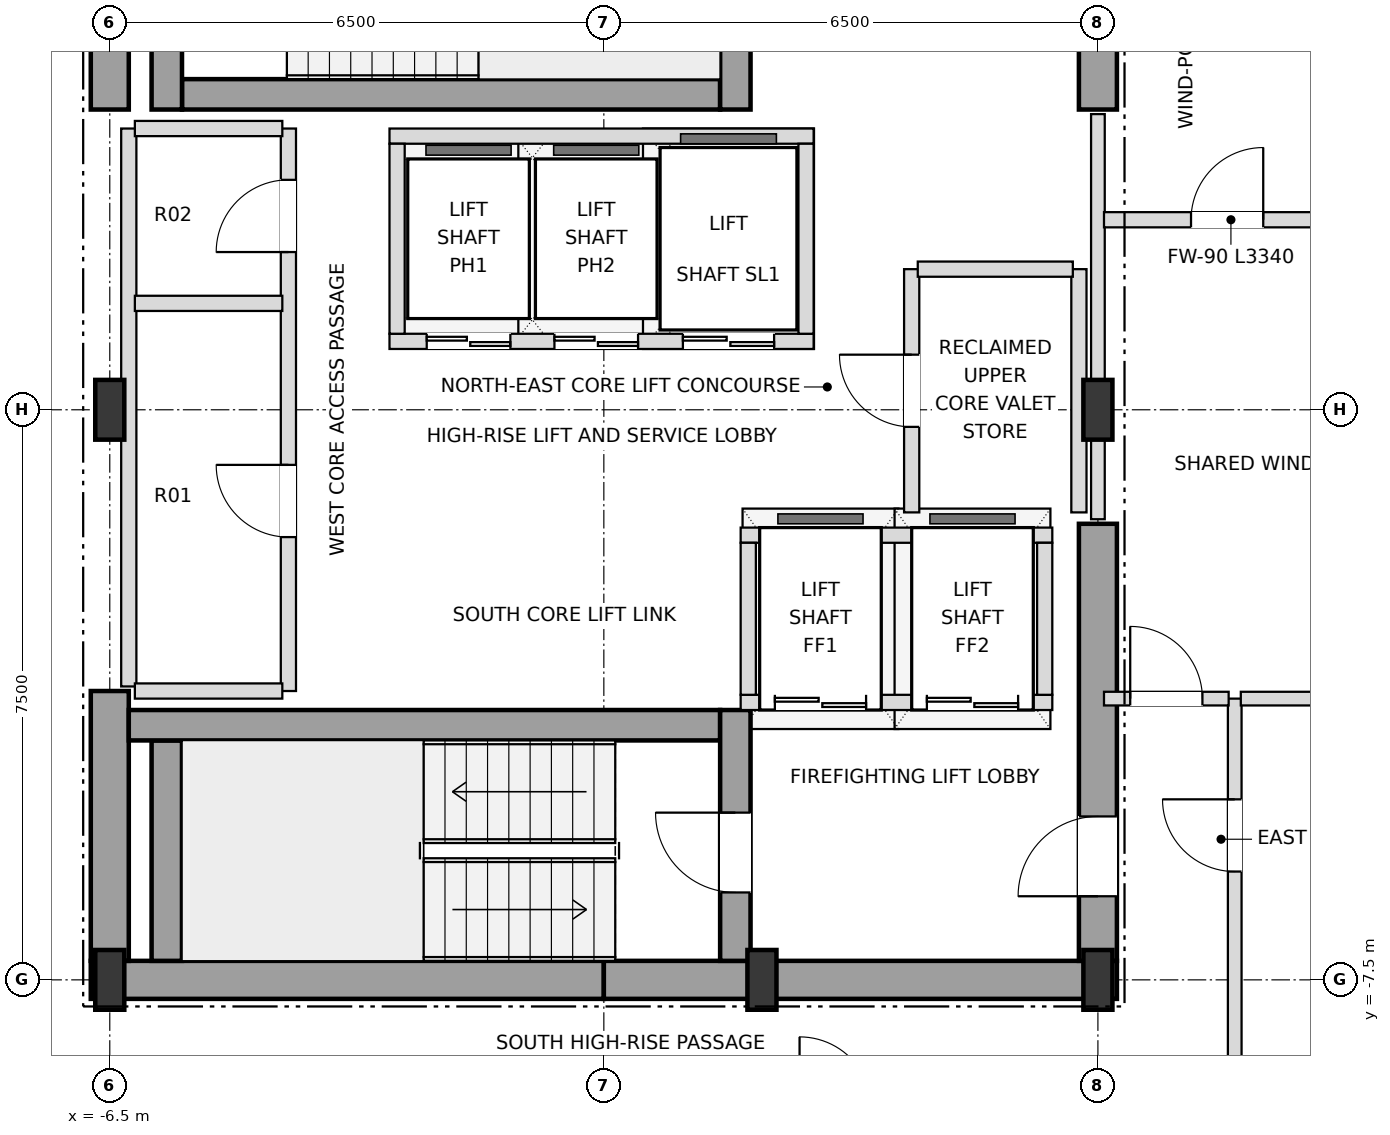
"""IFC4 building model, lengths in metres.
Left out: names, types, materials, properties, quantities, classifications, styles, units other than length and angle.
Written with IfcOpenShell. Run it as: python <this file> out.ifc"""

import sys

from ifc_helpers import new_model, si_unit, direction, frame, frame_2d, origin, origin_2d, place, context, subcontext, project, spatial, rectangle, i_section, extrude, element, fill, save


model = new_model("IFC4")
c1 = context("Model", 3, precision=1e-05, world=origin(), true_north=direction((0.0, 1.0)))
c2 = subcontext(c1, "Body", "Model", "MODEL_VIEW")
j1 = project(units=[si_unit("LENGTHUNIT", "METRE"), si_unit("PLANEANGLEUNIT", "RADIAN")], contexts=[c1])
p1 = place(None, origin())
s1 = spatial("IfcSite", under=j1, at=p1, CompositionType="ELEMENT")
p2 = place(p1, origin())
s2 = spatial("IfcBuilding", under=s1, at=p2, CompositionType="ELEMENT")
p3 = place(p2, frame((0.0, 0.0, 265.5)))
s3 = spatial("IfcBuildingStorey", under=s2, at=p3, CompositionType="ELEMENT", Elevation=265.5)
for number, where, z_axis, x_axis in (
    (1, (-6.5, -7.5, 0.0), (0.0, 0.0, 1.0), (1.0, 0.0, 0.0)),
    (2, (2.08, -7.5, 0.0), (0.0, 0.0, 1.0), (1.0, 0.0, 0.0)),
    (3, (6.5, -7.5, 0.0), (0.0, 0.0, 1.0), (1.0, 0.0, 0.0)),
    (4, (-6.5, 0.0, 0.0), (0.0, 0.0, 1.0), (1.0, 0.0, 0.0)),
    (5, (6.5, 0.0, 0.0), (0.0, 0.0, 1.0), (1.0, 0.0, 0.0)),
):
    element("IfcColumn", number, at=place(p3, frame(where, z_axis=z_axis, x_axis=x_axis)), inside=s3, PredefinedType="COLUMN", context=c2, shape_type="SweptSolid", body=[
        extrude(i_section(OverallWidth=0.382, OverallDepth=0.786, WebThickness=0.02, FlangeThickness=0.033, at=origin_2d()), origin(), (0.0, 0.0, 1.0), 3.6),
    ])
for number, where, z_axis, x_axis in (
    (6, (-6.75, -7.5, 0.0), (0.0, 0.0, 1.0), (1.0, 0.0, 0.0)),
    (7, (0.0, -7.5, 0.0), (0.0, 0.0, 1.0), (1.0, 0.0, 0.0)),
):
    element("IfcWall", number, at=place(p3, frame(where, z_axis=z_axis, x_axis=x_axis)), inside=s3, PredefinedType="SHEAR", context=c2, shape_type="SweptSolid", body=[
        extrude(rectangle(XDim=6.75, YDim=0.5, at=frame_2d((3.375, 0.0))), origin(), (0.0, 0.0, 1.0), 3.38),
    ])
p4 = place(p3, frame((-6.5, -7.25, 0.0), z_axis=(0.0, 0.0, 1.0), x_axis=(0.0, 1.0, 0.0)))
e8 = element("IfcWall", 8, at=p4, inside=s3, PredefinedType="SHEAR", context=c2, shape_type="SweptSolid", body=[
    extrude(rectangle(XDim=3.55, YDim=0.5, at=frame_2d((1.775, 0.0))), origin(), (0.0, 0.0, 1.0), 3.38),
])
p5 = place(p3, frame((-6.5, 3.95, 0.0), z_axis=(0.0, 0.0, 1.0), x_axis=(0.0, 1.0, 0.0)))
e9 = element("IfcWall", 9, at=p5, inside=s3, PredefinedType="SHEAR", context=c2, shape_type="SweptSolid", body=[
    extrude(rectangle(XDim=3.3, YDim=0.5, at=frame_2d((1.65, 0.0))), origin(), (0.0, 0.0, 1.0), 3.38),
])
p6 = place(p3, frame((6.5, -7.25, 0.0), z_axis=(0.0, 0.0, 1.0), x_axis=(0.0, 1.0, 0.0)))
e10 = element("IfcWall", 10, at=p6, inside=s3, PredefinedType="SHEAR", context=c2, shape_type="SweptSolid", body=[
    extrude(rectangle(XDim=5.75, YDim=0.5, at=frame_2d((2.875, 0.0))), origin(), (0.0, 0.0, 1.0), 3.38),
])
p7 = place(p6, frame((0.85, 0.0, 0.0)))
e11 = element("IfcOpeningElement", 11, at=p7, cuts=e10, PredefinedType="OPENING", context=c2, shape_type="SweptSolid", body=[
    extrude(rectangle(XDim=1.05, YDim=2.15, at=frame_2d((0.525, 1.075))), frame((0.0, 0.26, 0.0), z_axis=(0.0, -1.0, 0.0), x_axis=(1.0, 0.0, 0.0)), (0.0, 0.0, 1.0), 0.52),
])
p8 = place(p3, frame((6.5, 3.95, 0.0), z_axis=(0.0, 0.0, 1.0), x_axis=(0.0, 1.0, 0.0)))
e12 = element("IfcWall", 12, at=p8, inside=s3, PredefinedType="SHEAR", context=c2, shape_type="SweptSolid", body=[
    extrude(rectangle(XDim=3.3, YDim=0.5, at=frame_2d((1.65, 0.0))), origin(), (0.0, 0.0, 1.0), 3.38),
])
p9 = place(p3, frame((-5.75, -7.25, 0.0), z_axis=(0.0, 0.0, 1.0), x_axis=(0.0, 1.0, 0.0)))
e13 = element("IfcWall", 13, at=p9, inside=s3, PredefinedType="SHEAR", context=c2, shape_type="SweptSolid", body=[
    extrude(rectangle(XDim=2.9, YDim=0.4, at=frame_2d((1.45, 0.0))), origin(), (0.0, 0.0, 1.0), 3.38),
])
p10 = place(p3, frame((-6.25, -4.15, 0.0), z_axis=(0.0, 0.0, 1.0), x_axis=(1.0, 0.0, 0.0)))
e14 = element("IfcWall", 14, at=p10, inside=s3, PredefinedType="SHEAR", context=c2, shape_type="SweptSolid", body=[
    extrude(rectangle(XDim=7.78, YDim=0.4, at=frame_2d((3.89, 0.0))), origin(), (0.0, 0.0, 1.0), 3.38),
])
p11 = place(p3, frame((1.73, -7.25, 0.0), z_axis=(0.0, 0.0, 1.0), x_axis=(0.0, 1.0, 0.0)))
e15 = element("IfcWall", 15, at=p11, inside=s3, PredefinedType="SHEAR", context=c2, shape_type="SweptSolid", body=[
    extrude(rectangle(XDim=3.3, YDim=0.4, at=frame_2d((1.65, 0.0))), origin(), (0.0, 0.0, 1.0), 3.38),
])
p12 = place(p11, frame((0.9, 0.0, 0.0)))
e16 = element("IfcOpeningElement", 16, at=p12, cuts=e15, PredefinedType="OPENING", context=c2, shape_type="SweptSolid", body=[
    extrude(rectangle(XDim=1.05, YDim=2.15, at=frame_2d((0.525, 1.075))), frame((0.0, 0.21, 0.0), z_axis=(0.0, -1.0, 0.0), x_axis=(1.0, 0.0, 0.0)), (0.0, 0.0, 1.0), 0.42),
])
p13 = place(p3, frame((-5.55, 4.15, 0.0), z_axis=(0.0, 0.0, 1.0), x_axis=(1.0, 0.0, 0.0)))
e17 = element("IfcWall", 17, at=p13, inside=s3, PredefinedType="SHEAR", context=c2, shape_type="SweptSolid", body=[
    extrude(rectangle(XDim=7.08, YDim=0.4, at=frame_2d((3.54, 0.0))), origin(), (0.0, 0.0, 1.0), 3.38),
])
for number, where, z_axis, x_axis in (
    (18, (1.73, 3.95, 0.0), (0.0, 0.0, 1.0), (0.0, 1.0, 0.0)),
    (19, (-5.75, 3.95, 0.0), (0.0, 0.0, 1.0), (0.0, 1.0, 0.0)),
):
    element("IfcWall", number, at=place(p3, frame(where, z_axis=z_axis, x_axis=x_axis)), inside=s3, PredefinedType="SHEAR", context=c2, shape_type="SweptSolid", body=[
        extrude(rectangle(XDim=3.3, YDim=0.4, at=frame_2d((1.65, 0.0))), origin(), (0.0, 0.0, 1.0), 3.38),
    ])
p14 = place(p3, frame((-2.82, 0.9, 0.0), z_axis=(0.0, 0.0, 1.0), x_axis=(1.0, 0.0, 0.0)))
e20 = element("IfcWall", 20, at=p14, inside=s3, PredefinedType="SOLIDWALL", context=c2, shape_type="SweptSolid", body=[
    extrude(rectangle(XDim=5.58, YDim=0.2, at=frame_2d((2.79, 0.0))), origin(), (0.0, 0.0, 1.0), 3.38),
])
p15 = place(p14, frame((0.49, 0.0, 0.0)))
e21 = element("IfcOpeningElement", 21, at=p15, cuts=e20, PredefinedType="OPENING", context=c2, shape_type="SweptSolid", body=[
    extrude(rectangle(XDim=1.1, YDim=2.15, at=frame_2d((0.55, 1.075))), frame((0.0, 0.11, 0.0), z_axis=(0.0, -1.0, 0.0), x_axis=(1.0, 0.0, 0.0)), (0.0, 0.0, 1.0), 0.22),
])
p16 = place(p14, frame((2.17, 0.0, 0.0)))
e22 = element("IfcOpeningElement", 22, at=p16, cuts=e20, PredefinedType="OPENING", context=c2, shape_type="SweptSolid", body=[
    extrude(rectangle(XDim=1.1, YDim=2.15, at=frame_2d((0.55, 1.075))), frame((0.0, 0.11, 0.0), z_axis=(0.0, -1.0, 0.0), x_axis=(1.0, 0.0, 0.0)), (0.0, 0.0, 1.0), 0.22),
])
p17 = place(p14, frame((3.86, 0.0, 0.0)))
e23 = element("IfcOpeningElement", 23, at=p17, cuts=e20, PredefinedType="OPENING", context=c2, shape_type="SweptSolid", body=[
    extrude(rectangle(XDim=1.2, YDim=2.2, at=frame_2d((0.6, 1.1))), frame((0.0, 0.11, 0.0), z_axis=(0.0, -1.0, 0.0), x_axis=(1.0, 0.0, 0.0)), (0.0, 0.0, 1.0), 0.22),
])
p18 = place(p3, frame((-2.82, 3.6, 0.0), z_axis=(0.0, 0.0, 1.0), x_axis=(1.0, 0.0, 0.0)))
e24 = element("IfcWall", 24, at=p18, inside=s3, PredefinedType="SOLIDWALL", context=c2, shape_type="SweptSolid", body=[
    extrude(rectangle(XDim=5.58, YDim=0.2, at=frame_2d((2.79, 0.0))), origin(), (0.0, 0.0, 1.0), 3.38),
])
for number, where, z_axis, x_axis in (
    (25, (-2.72, 1.0, 0.0), (0.0, 0.0, 1.0), (0.0, 1.0, 0.0)),
    (26, (2.66, 1.0, 0.0), (0.0, 0.0, 1.0), (0.0, 1.0, 0.0)),
):
    element("IfcWall", number, at=place(p3, frame(where, z_axis=z_axis, x_axis=x_axis)), inside=s3, PredefinedType="SOLIDWALL", context=c2, shape_type="SweptSolid", body=[
        extrude(rectangle(XDim=2.5, YDim=0.2, at=frame_2d((1.25, 0.0))), origin(), (0.0, 0.0, 1.0), 3.38),
    ])
p19 = place(p3, frame((1.8, -3.85, 0.0), z_axis=(0.0, 0.0, 1.0), x_axis=(1.0, 0.0, 0.0)))
e27 = element("IfcWall", 27, at=p19, inside=s3, PredefinedType="SOLIDWALL", context=c2, shape_type="SweptSolid", body=[
    extrude(rectangle(XDim=4.1, YDim=0.2, at=frame_2d((2.05, 0.0))), origin(), (0.0, 0.0, 1.0), 3.38),
])
p20 = place(p19, frame((0.45, 0.0, 0.0)))
e28 = element("IfcOpeningElement", 28, at=p20, cuts=e27, PredefinedType="OPENING", context=c2, shape_type="SweptSolid", body=[
    extrude(rectangle(XDim=1.2, YDim=2.2, at=frame_2d((0.6, 1.1))), frame((0.0, 0.11, 0.0), z_axis=(0.0, -1.0, 0.0), x_axis=(1.0, 0.0, 0.0)), (0.0, 0.0, 1.0), 0.22),
])
p21 = place(p19, frame((2.45, 0.0, 0.0)))
e29 = element("IfcOpeningElement", 29, at=p21, cuts=e27, PredefinedType="OPENING", context=c2, shape_type="SweptSolid", body=[
    extrude(rectangle(XDim=1.2, YDim=2.2, at=frame_2d((0.6, 1.1))), frame((0.0, 0.11, 0.0), z_axis=(0.0, -1.0, 0.0), x_axis=(1.0, 0.0, 0.0)), (0.0, 0.0, 1.0), 0.22),
])
p22 = place(p3, frame((1.8, -1.65, 0.0), z_axis=(0.0, 0.0, 1.0), x_axis=(1.0, 0.0, 0.0)))
e30 = element("IfcWall", 30, at=p22, inside=s3, PredefinedType="SOLIDWALL", context=c2, shape_type="SweptSolid", body=[
    extrude(rectangle(XDim=4.1, YDim=0.2, at=frame_2d((2.05, 0.0))), origin(), (0.0, 0.0, 1.0), 3.38),
])
for number, where, z_axis, x_axis in (
    (31, (1.9, -3.75, 0.0), (0.0, 0.0, 1.0), (0.0, 1.0, 0.0)),
    (32, (5.8, -3.75, 0.0), (0.0, 0.0, 1.0), (0.0, 1.0, 0.0)),
):
    element("IfcWall", number, at=place(p3, frame(where, z_axis=z_axis, x_axis=x_axis)), inside=s3, PredefinedType="SOLIDWALL", context=c2, shape_type="SweptSolid", body=[
        extrude(rectangle(XDim=2.0, YDim=0.2, at=frame_2d((1.0, 0.0))), origin(), (0.0, 0.0, 1.0), 3.38),
    ])
p23 = place(p3, frame((-6.25, -3.64, 0.0), z_axis=(0.0, 0.0, 1.0), x_axis=(0.0, 1.0, 0.0)))
e33 = element("IfcWall", 33, at=p23, inside=s3, PredefinedType="SOLIDWALL", context=c2, shape_type="SweptSolid", body=[
    extrude(rectangle(XDim=7.34, YDim=0.2, at=frame_2d((3.67, 0.0))), origin(), (0.0, 0.0, 1.0), 3.38),
])
p24 = place(p3, frame((-4.15, -3.7, 0.0), z_axis=(0.0, 0.0, 1.0), x_axis=(0.0, 1.0, 0.0)))
e34 = element("IfcWall", 34, at=p24, inside=s3, PredefinedType="SOLIDWALL", context=c2, shape_type="SweptSolid", body=[
    extrude(rectangle(XDim=7.4, YDim=0.2, at=frame_2d((3.7, 0.0))), origin(), (0.0, 0.0, 1.0), 3.38),
])
p25 = place(p24, frame((2.025, 0.0, 0.0)))
e35 = element("IfcOpeningElement", 35, at=p25, cuts=e34, PredefinedType="OPENING", context=c2, shape_type="SweptSolid", body=[
    extrude(rectangle(XDim=0.95, YDim=2.15, at=frame_2d((0.475, 1.075))), frame((0.0, 0.11, 0.0), z_axis=(0.0, -1.0, 0.0), x_axis=(1.0, 0.0, 0.0)), (0.0, 0.0, 1.0), 0.22),
])
p26 = place(p24, frame((5.775, 0.0, 0.0)))
e36 = element("IfcOpeningElement", 36, at=p26, cuts=e34, PredefinedType="OPENING", context=c2, shape_type="SweptSolid", body=[
    extrude(rectangle(XDim=0.95, YDim=2.15, at=frame_2d((0.475, 1.075))), frame((0.0, 0.11, 0.0), z_axis=(0.0, -1.0, 0.0), x_axis=(1.0, 0.0, 0.0)), (0.0, 0.0, 1.0), 0.22),
])
p27 = place(p3, frame((4.05, -1.35, 0.0), z_axis=(0.0, 0.0, 1.0), x_axis=(0.0, 1.0, 0.0)))
e37 = element("IfcWall", 37, at=p27, inside=s3, PredefinedType="SOLIDWALL", context=c2, shape_type="SweptSolid", body=[
    extrude(rectangle(XDim=3.2, YDim=0.2, at=frame_2d((1.6, 0.0))), origin(), (0.0, 0.0, 1.0), 3.38),
])
p28 = place(p27, frame((1.125, 0.0, 0.0)))
e38 = element("IfcOpeningElement", 38, at=p28, cuts=e37, PredefinedType="OPENING", context=c2, shape_type="SweptSolid", body=[
    extrude(rectangle(XDim=0.95, YDim=2.15, at=frame_2d((0.475, 1.075))), frame((0.0, 0.11, 0.0), z_axis=(0.0, -1.0, 0.0), x_axis=(1.0, 0.0, 0.0)), (0.0, 0.0, 1.0), 0.22),
])
p29 = place(p3, frame((6.25, -1.35, 0.0), z_axis=(0.0, 0.0, 1.0), x_axis=(0.0, 1.0, 0.0)))
e39 = element("IfcWall", 39, at=p29, inside=s3, PredefinedType="SOLIDWALL", context=c2, shape_type="SweptSolid", body=[
    extrude(rectangle(XDim=3.2, YDim=0.2, at=frame_2d((1.6, 0.0))), origin(), (0.0, 0.0, 1.0), 3.38),
])
p30 = place(p3, frame((6.5, -1.44, 0.0), z_axis=(0.0, 0.0, 1.0), x_axis=(0.0, 1.0, 0.0)))
e40 = element("IfcWall", 40, at=p30, inside=s3, PredefinedType="PARTITIONING", context=c2, shape_type="SweptSolid", body=[
    extrude(rectangle(XDim=5.33, YDim=0.18, at=frame_2d((2.665, 0.0))), origin(), (0.0, 0.0, 1.0), 2.826),
])
p31 = place(p3, frame((8.3, -9.2, 0.0), z_axis=(0.0, 0.0, 1.0), x_axis=(0.0, 1.0, 0.0)))
e41 = element("IfcWall", 41, at=p31, inside=s3, PredefinedType="PARTITIONING", context=c2, shape_type="SweptSolid", body=[
    extrude(rectangle(XDim=5.4, YDim=0.18, at=frame_2d((2.7, 0.0))), origin(), (0.0, 0.0, 1.0), 2.826),
])
p32 = place(p31, frame((3.125, 0.0, 0.0)))
e42 = element("IfcOpeningElement", 42, at=p32, cuts=e41, PredefinedType="OPENING", context=c2, shape_type="SweptSolid", body=[
    extrude(rectangle(XDim=0.95, YDim=2.15, at=frame_2d((0.475, 1.075))), frame((0.0, 0.1, 0.0), z_axis=(0.0, -1.0, 0.0), x_axis=(1.0, 0.0, 0.0)), (0.0, 0.0, 1.0), 0.2),
])
p33 = place(p3, frame((6.58, -3.8, 0.0), z_axis=(0.0, 0.0, 1.0), x_axis=(1.0, 0.0, 0.0)))
e43 = element("IfcWall", 43, at=p33, inside=s3, PredefinedType="PARTITIONING", context=c2, shape_type="SweptSolid", body=[
    extrude(rectangle(XDim=1.64, YDim=0.18, at=frame_2d((0.82, 0.0))), origin(), (0.0, 0.0, 1.0), 3.38),
])
p34 = place(p33, frame((0.345, 0.0, 0.0)))
e44 = element("IfcOpeningElement", 44, at=p34, cuts=e43, PredefinedType="OPENING", context=c2, shape_type="SweptSolid", body=[
    extrude(rectangle(XDim=0.95, YDim=2.15, at=frame_2d((0.475, 1.075))), frame((0.0, 0.1, 0.0), z_axis=(0.0, -1.0, 0.0), x_axis=(1.0, 0.0, 0.0)), (0.0, 0.0, 1.0), 0.2),
])
p35 = place(p3, frame((8.38, -3.8, 0.0), z_axis=(0.0, 0.0, 1.0), x_axis=(1.0, 0.0, 0.0)))
e45 = element("IfcWall", 45, at=p35, inside=s3, PredefinedType="PARTITIONING", context=c2, shape_type="SweptSolid", body=[
    extrude(rectangle(XDim=8.44, YDim=0.18, at=frame_2d((4.22, 0.0))), origin(), (0.0, 0.0, 1.0), 3.018),
])
for number, where, z_axis, x_axis in (
    (46, (-6.17, -3.7, 0.0), (0.0, 0.0, 1.0), (1.0, 0.0, 0.0)),
    (47, (-6.17, 1.4, 0.0), (0.0, 0.0, 1.0), (1.0, 0.0, 0.0)),
):
    element("IfcWall", number, at=place(p3, frame(where, z_axis=z_axis, x_axis=x_axis)), inside=s3, PredefinedType="SOLIDWALL", context=c2, shape_type="SweptSolid", body=[
        extrude(rectangle(XDim=1.94, YDim=0.2, at=frame_2d((0.97, 0.0))), origin(), (0.0, 0.0, 1.0), 3.38),
    ])
p36 = place(p3, frame((4.13, 1.85, 0.0), z_axis=(0.0, 0.0, 1.0), x_axis=(1.0, 0.0, 0.0)))
e48 = element("IfcWall", 48, at=p36, inside=s3, PredefinedType="SOLIDWALL", context=c2, shape_type="SweptSolid", body=[
    extrude(rectangle(XDim=2.04, YDim=0.2, at=frame_2d((1.02, 0.0))), origin(), (0.0, 0.0, 1.0), 3.38),
])
p37 = place(p3, frame((6.58, 2.5, 0.0), z_axis=(0.0, 0.0, 1.0), x_axis=(1.0, 0.0, 0.0)))
e49 = element("IfcWall", 49, at=p37, inside=s3, PredefinedType="SOLIDWALL", context=c2, shape_type="SweptSolid", body=[
    extrude(rectangle(XDim=3.34, YDim=0.2, at=frame_2d((1.67, 0.0))), origin(), (0.0, 0.0, 1.0), 3.38),
])
p38 = place(p37, frame((1.145, 0.0, 0.0)))
e50 = element("IfcOpeningElement", 50, at=p38, cuts=e49, PredefinedType="OPENING", context=c2, shape_type="SweptSolid", body=[
    extrude(rectangle(XDim=0.95, YDim=2.15, at=frame_2d((0.475, 1.075))), frame((0.0, 0.11, 0.0), z_axis=(0.0, -1.0, 0.0), x_axis=(1.0, 0.0, 0.0)), (0.0, 0.0, 1.0), 0.22),
])
p39 = place(p3, frame((-6.17, 3.7, 0.0), z_axis=(0.0, 0.0, 1.0), x_axis=(1.0, 0.0, 0.0)))
e51 = element("IfcWall", 51, at=p39, inside=s3, PredefinedType="SOLIDWALL", context=c2, shape_type="SweptSolid", body=[
    extrude(rectangle(XDim=1.94, YDim=0.2, at=frame_2d((0.97, 0.0))), origin(), (0.0, 0.0, 1.0), 3.38),
])
p40 = place(p7, origin())
e52 = element("IfcDoor", 52, at=p40, inside=s3, OperationType="SINGLE_SWING_LEFT", PredefinedType="DOOR", context=c2, shape_type="SweptSolid", body=[
    extrude(rectangle(XDim=1.05, YDim=2.15, at=frame_2d((0.525, 1.075))), frame((0.0, 0.025, 0.0), z_axis=(0.0, -1.0, 0.0), x_axis=(1.0, 0.0, 0.0)), (0.0, 0.0, 1.0), 0.05),
])
fill(e11, e52)
p41 = place(p12, origin())
e53 = element("IfcDoor", 53, at=p41, inside=s3, OperationType="SINGLE_SWING_RIGHT", PredefinedType="DOOR", context=c2, shape_type="SweptSolid", body=[
    extrude(rectangle(XDim=1.05, YDim=2.15, at=frame_2d((0.525, 1.075))), frame((0.0, 0.025, 0.0), z_axis=(0.0, -1.0, 0.0), x_axis=(1.0, 0.0, 0.0)), (0.0, 0.0, 1.0), 0.05),
])
fill(e16, e53)
p42 = place(p15, origin())
e54 = element("IfcDoor", 54, at=p42, inside=s3, OperationType="DOUBLE_DOOR_SLIDING", PredefinedType="DOOR", context=c2, shape_type="SweptSolid", body=[
    extrude(rectangle(XDim=1.1, YDim=2.15, at=frame_2d((0.55, 1.075))), frame((0.0, 0.025, 0.0), z_axis=(0.0, -1.0, 0.0), x_axis=(1.0, 0.0, 0.0)), (0.0, 0.0, 1.0), 0.05),
])
fill(e21, e54)
p43 = place(p16, origin())
e55 = element("IfcDoor", 55, at=p43, inside=s3, OperationType="DOUBLE_DOOR_SLIDING", PredefinedType="DOOR", context=c2, shape_type="SweptSolid", body=[
    extrude(rectangle(XDim=1.1, YDim=2.15, at=frame_2d((0.55, 1.075))), frame((0.0, 0.025, 0.0), z_axis=(0.0, -1.0, 0.0), x_axis=(1.0, 0.0, 0.0)), (0.0, 0.0, 1.0), 0.05),
])
fill(e22, e55)
p44 = place(p17, origin())
e56 = element("IfcDoor", 56, at=p44, inside=s3, OperationType="DOUBLE_DOOR_SLIDING", PredefinedType="DOOR", context=c2, shape_type="SweptSolid", body=[
    extrude(rectangle(XDim=1.2, YDim=2.2, at=frame_2d((0.6, 1.1))), frame((0.0, 0.025, 0.0), z_axis=(0.0, -1.0, 0.0), x_axis=(1.0, 0.0, 0.0)), (0.0, 0.0, 1.0), 0.05),
])
fill(e23, e56)
p45 = place(p20, origin())
e57 = element("IfcDoor", 57, at=p45, inside=s3, OperationType="DOUBLE_DOOR_SLIDING", PredefinedType="DOOR", context=c2, shape_type="SweptSolid", body=[
    extrude(rectangle(XDim=1.2, YDim=2.2, at=frame_2d((0.6, 1.1))), frame((0.0, 0.025, 0.0), z_axis=(0.0, -1.0, 0.0), x_axis=(1.0, 0.0, 0.0)), (0.0, 0.0, 1.0), 0.05),
])
fill(e28, e57)
p46 = place(p21, origin())
e58 = element("IfcDoor", 58, at=p46, inside=s3, OperationType="DOUBLE_DOOR_SLIDING", PredefinedType="DOOR", context=c2, shape_type="SweptSolid", body=[
    extrude(rectangle(XDim=1.2, YDim=2.2, at=frame_2d((0.6, 1.1))), frame((0.0, 0.025, 0.0), z_axis=(0.0, -1.0, 0.0), x_axis=(1.0, 0.0, 0.0)), (0.0, 0.0, 1.0), 0.05),
])
fill(e29, e58)
p47 = place(p25, origin())
e59 = element("IfcDoor", 59, at=p47, inside=s3, OperationType="SINGLE_SWING_RIGHT", PredefinedType="DOOR", context=c2, shape_type="SweptSolid", body=[
    extrude(rectangle(XDim=0.95, YDim=2.15, at=frame_2d((0.475, 1.075))), frame((0.0, 0.025, 0.0), z_axis=(0.0, -1.0, 0.0), x_axis=(1.0, 0.0, 0.0)), (0.0, 0.0, 1.0), 0.05),
])
fill(e35, e59)
p48 = place(p26, origin())
e60 = element("IfcDoor", 60, at=p48, inside=s3, OperationType="SINGLE_SWING_LEFT", PredefinedType="DOOR", context=c2, shape_type="SweptSolid", body=[
    extrude(rectangle(XDim=0.95, YDim=2.15, at=frame_2d((0.475, 1.075))), frame((0.0, 0.025, 0.0), z_axis=(0.0, -1.0, 0.0), x_axis=(1.0, 0.0, 0.0)), (0.0, 0.0, 1.0), 0.05),
])
fill(e36, e60)
p49 = place(p28, origin())
e61 = element("IfcDoor", 61, at=p49, inside=s3, OperationType="SINGLE_SWING_RIGHT", PredefinedType="DOOR", context=c2, shape_type="SweptSolid", body=[
    extrude(rectangle(XDim=0.95, YDim=2.15, at=frame_2d((0.475, 1.075))), frame((0.0, 0.025, 0.0), z_axis=(0.0, -1.0, 0.0), x_axis=(1.0, 0.0, 0.0)), (0.0, 0.0, 1.0), 0.05),
])
fill(e38, e61)
p50 = place(p32, origin())
e62 = element("IfcDoor", 62, at=p50, inside=s3, OperationType="SINGLE_SWING_RIGHT", PredefinedType="DOOR", context=c2, shape_type="SweptSolid", body=[
    extrude(rectangle(XDim=0.95, YDim=2.15, at=frame_2d((0.475, 1.075))), frame((0.0, 0.025, 0.0), z_axis=(0.0, -1.0, 0.0), x_axis=(1.0, 0.0, 0.0)), (0.0, 0.0, 1.0), 0.05),
])
fill(e42, e62)
p51 = place(p34, origin())
e63 = element("IfcDoor", 63, at=p51, inside=s3, OperationType="SINGLE_SWING_LEFT", PredefinedType="DOOR", context=c2, shape_type="SweptSolid", body=[
    extrude(rectangle(XDim=0.95, YDim=2.15, at=frame_2d((0.475, 1.075))), frame((0.0, 0.025, 0.0), z_axis=(0.0, -1.0, 0.0), x_axis=(1.0, 0.0, 0.0)), (0.0, 0.0, 1.0), 0.05),
])
fill(e44, e63)
p52 = place(p38, origin())
e64 = element("IfcDoor", 64, at=p52, inside=s3, OperationType="SINGLE_SWING_RIGHT", PredefinedType="DOOR", context=c2, shape_type="SweptSolid", body=[
    extrude(rectangle(XDim=0.95, YDim=2.15, at=frame_2d((0.475, 1.075))), frame((0.0, 0.025, 0.0), z_axis=(0.0, -1.0, 0.0), x_axis=(1.0, 0.0, 0.0)), (0.0, 0.0, 1.0), 0.05),
])
fill(e50, e64)
save(model, sys.argv[1])
